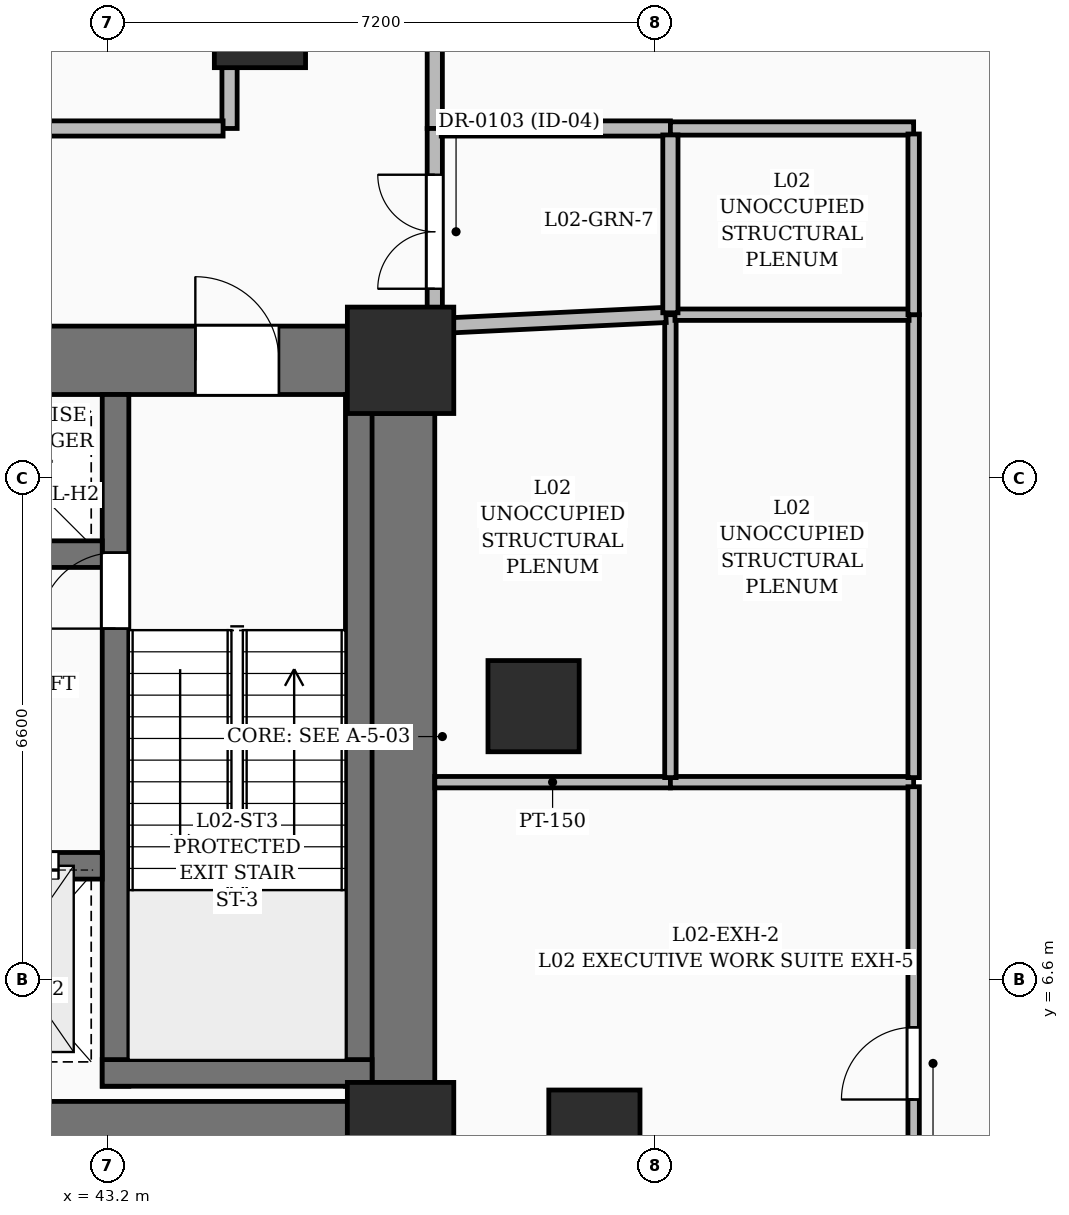
"""IFC4 building model, lengths in metres.
Left out: names, types, materials, properties, quantities, classifications, styles, units other than length and angle.
Written with IfcOpenShell. Run it as: python <this file> out.ifc"""

import sys

from ifc_helpers import new_model, si_unit, direction, frame, frame_2d, origin, origin_2d, place, context, subcontext, project, spatial, rectangle, extrude, element, fill, save


model = new_model("IFC4")
c1 = context("Model", 3, precision=1e-05, world=origin(), true_north=direction((0.0, 1.0)))
c2 = subcontext(c1, "Body", "Model", "MODEL_VIEW")
j1 = project(units=[si_unit("LENGTHUNIT", "METRE"), si_unit("PLANEANGLEUNIT", "RADIAN")], contexts=[c1])
p1 = place(None, origin())
s1 = spatial("IfcSite", under=j1, at=p1, CompositionType="ELEMENT")
p2 = place(p1, origin())
s2 = spatial("IfcBuilding", under=s1, at=p2, CompositionType="ELEMENT")
p3 = place(p2, frame((0.0, 0.0, 12.9)))
s3 = spatial("IfcBuildingStorey", under=s2, at=p3, CompositionType="ELEMENT", Elevation=12.9)
for number, where, z_axis, x_axis in (
    (1, (47.05, 4.55, 0.0), (0.0, 0.0, 1.0), (1.0, 0.0, 0.0)),
    (2, (47.05, 14.75, 0.0), (0.0, 0.0, 1.0), (1.0, 0.0, 0.0)),
):
    element("IfcColumn", number, at=place(p3, frame(where, z_axis=z_axis, x_axis=x_axis)), inside=s3, PredefinedType="COLUMN", context=c2, shape_type="SweptSolid", body=[
        extrude(rectangle(XDim=1.4, YDim=1.4, at=origin_2d()), origin(), (0.0, 0.0, 1.0), 4.5),
    ])
for number, where, z_axis, x_axis in (
    (3, (49.6, 4.55, 0.0), (0.0, 0.0, 1.0), (1.0, 0.0, 0.0)),
    (4, (48.8, 10.2, 0.0), (0.0, 0.0, 1.0), (1.0, 0.0, 0.0)),
    (5, (45.2, 19.2, 0.0), (0.0, 0.0, 1.0), (1.0, 0.0, 0.0)),
):
    element("IfcColumn", number, at=place(p3, frame(where, z_axis=z_axis, x_axis=x_axis)), inside=s3, PredefinedType="COLUMN", context=c2, shape_type="SweptSolid", body=[
        extrude(rectangle(XDim=1.2, YDim=1.2, at=origin_2d()), origin(), (0.0, 0.0, 1.0), 4.5),
    ])
p4 = place(p3, frame((35.85, 4.55, 0.0), z_axis=(0.0, 0.0, 1.0), x_axis=(1.0, 0.0, 0.0)))
e6 = element("IfcWall", 6, at=p4, inside=s3, PredefinedType="SHEAR", context=c2, shape_type="SweptSolid", body=[
    extrude(rectangle(XDim=10.5, YDim=0.9, at=frame_2d((5.25, 0.0))), origin(), (0.0, 0.0, 1.0), 4.5),
])
p5 = place(p3, frame((35.85, 14.75, 0.0), z_axis=(0.0, 0.0, 1.0), x_axis=(1.0, 0.0, 0.0)))
e7 = element("IfcWall", 7, at=p5, inside=s3, PredefinedType="SHEAR", context=c2, shape_type="SweptSolid", body=[
    extrude(rectangle(XDim=10.5, YDim=0.9, at=frame_2d((5.25, 0.0))), origin(), (0.0, 0.0, 1.0), 4.5),
])
p6 = place(p5, frame((0.9, 0.0, 0.0)))
e8 = element("IfcOpeningElement", 8, at=p6, cuts=e7, PredefinedType="OPENING", context=c2, shape_type="SweptSolid", body=[
    extrude(rectangle(XDim=1.1, YDim=2.2, at=frame_2d((0.55, 1.1))), frame((0.0, 0.46, 0.0), z_axis=(0.0, -1.0, 0.0), x_axis=(1.0, 0.0, 0.0)), (0.0, 0.0, 1.0), 0.92),
])
p7 = place(p5, frame((8.5, 0.0, 0.0)))
e9 = element("IfcOpeningElement", 9, at=p7, cuts=e7, PredefinedType="OPENING", context=c2, shape_type="SweptSolid", body=[
    extrude(rectangle(XDim=1.1, YDim=2.2, at=frame_2d((0.55, 1.1))), frame((0.0, 0.46, 0.0), z_axis=(0.0, -1.0, 0.0), x_axis=(1.0, 0.0, 0.0)), (0.0, 0.0, 1.0), 0.92),
])
p8 = place(p3, frame((47.05, 5.25, 0.0), z_axis=(0.0, 0.0, 1.0), x_axis=(0.0, 1.0, 0.0)))
e10 = element("IfcWall", 10, at=p8, inside=s3, PredefinedType="SHEAR", context=c2, shape_type="SweptSolid", body=[
    extrude(rectangle(XDim=8.8, YDim=0.9, at=frame_2d((4.4, 0.0))), origin(), (0.0, 0.0, 1.0), 4.5),
])
p9 = place(p3, frame((43.3, 5.2, 0.0), z_axis=(0.0, 0.0, 1.0), x_axis=(0.0, 1.0, 0.0)))
e11 = element("IfcWall", 11, at=p9, inside=s3, PredefinedType="SOLIDWALL", context=c2, shape_type="SweptSolid", body=[
    extrude(rectangle(XDim=9.1, YDim=0.35, at=frame_2d((4.55, 0.0))), origin(), (0.0, 0.0, 1.0), 4.5),
])
p10 = place(p9, frame((6.02, 0.0, 0.0)))
e12 = element("IfcOpeningElement", 12, at=p10, cuts=e11, PredefinedType="OPENING", context=c2, shape_type="SweptSolid", body=[
    extrude(rectangle(XDim=1.0, YDim=2.15, at=frame_2d((0.5, 1.075))), frame((0.0, 0.185, 0.0), z_axis=(0.0, -1.0, 0.0), x_axis=(1.0, 0.0, 0.0)), (0.0, 0.0, 1.0), 0.37),
])
p11 = place(p3, frame((46.5, 5.2, 0.0), z_axis=(0.0, 0.0, 1.0), x_axis=(0.0, 1.0, 0.0)))
e13 = element("IfcWall", 13, at=p11, inside=s3, PredefinedType="SOLIDWALL", context=c2, shape_type="SweptSolid", body=[
    extrude(rectangle(XDim=9.1, YDim=0.35, at=frame_2d((4.55, 0.0))), origin(), (0.0, 0.0, 1.0), 4.5),
])
p12 = place(p3, frame((43.125, 5.375, 0.0), z_axis=(0.0, 0.0, 1.0), x_axis=(1.0, 0.0, 0.0)))
e14 = element("IfcWall", 14, at=p12, inside=s3, PredefinedType="SOLIDWALL", context=c2, shape_type="SweptSolid", body=[
    extrude(rectangle(XDim=3.55, YDim=0.35, at=frame_2d((1.775, 0.0))), origin(), (0.0, 0.0, 1.0), 4.5),
])
p13 = place(p3, frame((39.075, 8.1, 0.0), z_axis=(0.0, 0.0, 1.0), x_axis=(1.0, 0.0, 0.0)))
e15 = element("IfcWall", 15, at=p13, inside=s3, PredefinedType="SOLIDWALL", context=c2, shape_type="SweptSolid", body=[
    extrude(rectangle(XDim=4.05, YDim=0.35, at=frame_2d((2.025, 0.0))), origin(), (0.0, 0.0, 1.0), 4.5),
])
p14 = place(p13, frame((2.175, 0.0, 0.0)))
e16 = element("IfcOpeningElement", 16, at=p14, cuts=e15, PredefinedType="OPENING", context=c2, shape_type="SweptSolid", body=[
    extrude(rectangle(XDim=1.3, YDim=2.25, at=frame_2d((0.65, 1.125))), frame((0.0, 0.185, 0.0), z_axis=(0.0, -1.0, 0.0), x_axis=(1.0, 0.0, 0.0)), (0.0, 0.0, 1.0), 0.37),
])
p15 = place(p13, frame((0.275, 0.0, 0.0)))
e17 = element("IfcOpeningElement", 17, at=p15, cuts=e15, PredefinedType="OPENING", context=c2, shape_type="SweptSolid", body=[
    extrude(rectangle(XDim=1.1, YDim=2.2, at=frame_2d((0.55, 1.1))), frame((0.0, 0.185, 0.0), z_axis=(0.0, -1.0, 0.0), x_axis=(1.0, 0.0, 0.0)), (0.0, 0.0, 1.0), 0.37),
])
p16 = place(p3, frame((39.075, 12.2, 0.0), z_axis=(0.0, 0.0, 1.0), x_axis=(1.0, 0.0, 0.0)))
e18 = element("IfcWall", 18, at=p16, inside=s3, PredefinedType="SOLIDWALL", context=c2, shape_type="SweptSolid", body=[
    extrude(rectangle(XDim=4.05, YDim=0.35, at=frame_2d((2.025, 0.0))), origin(), (0.0, 0.0, 1.0), 4.5),
])
p17 = place(p3, frame((47.5, 17.8, 0.0), z_axis=(0.0, 0.0, 1.0), x_axis=(0.0, 1.0, 0.0)))
e19 = element("IfcWall", 19, at=p17, inside=s3, PredefinedType="PARTITIONING", context=c2, shape_type="SweptSolid", body=[
    extrude(rectangle(XDim=6.7, YDim=0.2, at=frame_2d((3.35, 0.0))), origin(), (0.0, 0.0, 1.0), 3.637),
])
p18 = place(p17, frame((2.491, 0.0, 0.0)))
e20 = element("IfcOpeningElement", 20, at=p18, cuts=e19, PredefinedType="OPENING", context=c2, shape_type="SweptSolid", body=[
    extrude(rectangle(XDim=1.6, YDim=2.3, at=frame_2d((0.8, 1.15))), frame((0.0, 0.11, 0.0), z_axis=(0.0, -1.0, 0.0), x_axis=(1.0, 0.0, 0.0)), (0.0, 0.0, 1.0), 0.22),
])
p19 = place(p3, frame((47.5, 15.2, 0.0), z_axis=(0.0, 0.0, 1.0), x_axis=(0.0, 1.0, 0.0)))
e21 = element("IfcWall", 21, at=p19, inside=s3, PredefinedType="PARTITIONING", context=c2, shape_type="SweptSolid", body=[
    extrude(rectangle(XDim=2.6, YDim=0.2, at=frame_2d((1.3, 0.0))), origin(), (0.0, 0.0, 1.0), 3.078),
])
p20 = place(p19, frame((0.491, 0.0, 0.0)))
e22 = element("IfcOpeningElement", 22, at=p20, cuts=e21, PredefinedType="OPENING", context=c2, shape_type="SweptSolid", body=[
    extrude(rectangle(XDim=1.5, YDim=2.2, at=frame_2d((0.75, 1.1))), frame((0.0, 0.11, 0.0), z_axis=(0.0, -1.0, 0.0), x_axis=(1.0, 0.0, 0.0)), (0.0, 0.0, 1.0), 0.22),
])
p21 = place(p3, frame((44.8, 25.5, 0.0), z_axis=(0.0, 0.0, 1.0), x_axis=(0.0, -1.0, 0.0)))
e23 = element("IfcWall", 23, at=p21, inside=s3, PredefinedType="PARTITIONING", context=c2, shape_type="SweptSolid", body=[
    extrude(rectangle(XDim=7.7, YDim=0.2, at=frame_2d((3.85, 0.0))), origin(), (0.0, 0.0, 1.0), 3.159),
])
p22 = place(p3, frame((44.715, 17.8, 0.0), z_axis=(0.0, 0.0, 1.0), x_axis=(-1.0, 0.0, 0.0)))
e24 = element("IfcWall", 24, at=p22, inside=s3, PredefinedType="PARTITIONING", context=c2, shape_type="SweptSolid", body=[
    extrude(rectangle(XDim=15.515, YDim=0.2, at=frame_2d((7.758, 0.0))), origin(), (0.0, 0.0, 1.0), 3.159),
])
p23 = place(p22, frame((7.205, 0.0, 0.0)))
e25 = element("IfcOpeningElement", 25, at=p23, cuts=e24, PredefinedType="OPENING", context=c2, shape_type="SweptSolid", body=[
    extrude(rectangle(XDim=0.9, YDim=2.1, at=frame_2d((0.45, 1.05))), frame((0.0, 0.11, 0.0), z_axis=(0.0, -1.0, 0.0), x_axis=(1.0, 0.0, 0.0)), (0.0, 0.0, 1.0), 0.22),
])
p24 = place(p3, frame((50.6, 9.2, 0.0), z_axis=(0.0, 0.0, 1.0), x_axis=(-1.0, 0.0, 0.0)))
e26 = element("IfcWall", 26, at=p24, inside=s3, PredefinedType="PARTITIONING", context=c2, shape_type="SweptSolid", body=[
    extrude(rectangle(XDim=3.1, YDim=0.15, at=frame_2d((1.55, 0.0))), origin(), (0.0, 0.0, 1.0), 3.159),
])
p25 = place(p3, frame((53.8, 9.2, 0.0), z_axis=(0.0, 0.0, 1.0), x_axis=(-1.0, 0.0, 0.0)))
e27 = element("IfcWall", 27, at=p25, inside=s3, PredefinedType="PARTITIONING", context=c2, shape_type="SweptSolid", body=[
    extrude(rectangle(XDim=3.2, YDim=0.15, at=frame_2d((1.6, 0.0))), origin(), (0.0, 0.0, 1.0), 3.637),
])
p26 = place(p3, frame((53.8, 1.9, 0.0), z_axis=(0.0, 0.0, 1.0), x_axis=(0.0, 1.0, 0.0)))
e28 = element("IfcWall", 28, at=p26, inside=s3, PredefinedType="PARTITIONING", context=c2, shape_type="SweptSolid", body=[
    extrude(rectangle(XDim=7.24, YDim=0.15, at=frame_2d((3.62, 0.0))), origin(), (0.0, 0.0, 1.0), 2.97),
])
p27 = place(p26, frame((3.125, 0.0, 0.0)))
e29 = element("IfcOpeningElement", 29, at=p27, cuts=e28, PredefinedType="OPENING", context=c2, shape_type="SweptSolid", body=[
    extrude(rectangle(XDim=0.95, YDim=2.2, at=frame_2d((0.475, 1.1))), frame((0.0, 0.085, 0.0), z_axis=(0.0, -1.0, 0.0), x_axis=(1.0, 0.0, 0.0)), (0.0, 0.0, 1.0), 0.17),
])
p28 = place(p3, frame((50.6, 9.26, 0.0), z_axis=(0.0, 0.0, 1.0), x_axis=(0.0, 1.0, 0.0)))
e30 = element("IfcWall", 30, at=p28, inside=s3, PredefinedType="PARTITIONING", context=c2, shape_type="SweptSolid", body=[
    extrude(rectangle(XDim=6.09, YDim=0.15, at=frame_2d((3.045, 0.0))), origin(), (0.0, 0.0, 1.0), 3.078),
])
p29 = place(p3, frame((50.54, 15.347, 0.0), z_axis=(0.0, 0.0, 1.0), x_axis=(-0.998830110694, -0.048357108796, 0.0)))
e31 = element("IfcWall", 31, at=p29, inside=s3, PredefinedType="PARTITIONING", context=c2, shape_type="SweptSolid", body=[
    extrude(rectangle(XDim=2.958, YDim=0.2, at=frame_2d((1.479, 0.0))), origin(), (0.0, 0.0, 1.0), 3.078),
])
p30 = place(p3, frame((53.8, 9.26, 0.0), z_axis=(0.0, 0.0, 1.0), x_axis=(0.0, 1.0, 0.0)))
e32 = element("IfcWall", 32, at=p30, inside=s3, PredefinedType="PARTITIONING", context=c2, shape_type="SweptSolid", body=[
    extrude(rectangle(XDim=6.09, YDim=0.15, at=frame_2d((3.045, 0.0))), origin(), (0.0, 0.0, 1.0), 3.078),
])
p31 = place(p3, frame((53.74, 15.35, 0.0), z_axis=(0.0, 0.0, 1.0), x_axis=(-1.0, 0.0, 0.0)))
e33 = element("IfcWall", 33, at=p31, inside=s3, PredefinedType="PARTITIONING", context=c2, shape_type="SweptSolid", body=[
    extrude(rectangle(XDim=3.08, YDim=0.15, at=frame_2d((1.54, 0.0))), origin(), (0.0, 0.0, 1.0), 3.637),
])
p32 = place(p3, frame((47.585, 17.8, 0.0), z_axis=(0.0, 0.0, 1.0), x_axis=(1.0, 0.0, 0.0)))
e34 = element("IfcWall", 34, at=p32, inside=s3, PredefinedType="PARTITIONING", context=c2, shape_type="SweptSolid", body=[
    extrude(rectangle(XDim=3.015, YDim=0.2, at=frame_2d((1.508, 0.0))), origin(), (0.0, 0.0, 1.0), 3.078),
])
p33 = place(p3, frame((50.6, 17.8, 0.0), z_axis=(0.0, 0.0, 1.0), x_axis=(1.0, 0.0, 0.0)))
e35 = element("IfcWall", 35, at=p33, inside=s3, PredefinedType="PARTITIONING", context=c2, shape_type="SweptSolid", body=[
    extrude(rectangle(XDim=3.2, YDim=0.175, at=frame_2d((1.6, 0.0))), origin(), (0.0, 0.0, 1.0), 3.637),
])
p34 = place(p3, frame((53.8, 17.728, 0.0), z_axis=(0.0, 0.0, 1.0), x_axis=(0.0, -1.0, 0.0)))
e36 = element("IfcWall", 36, at=p34, inside=s3, PredefinedType="PARTITIONING", context=c2, shape_type="SweptSolid", body=[
    extrude(rectangle(XDim=2.377, YDim=0.15, at=frame_2d((1.189, 0.0))), origin(), (0.0, 0.0, 1.0), 3.637),
])
p35 = place(p3, frame((50.6, 15.375, 0.0), z_axis=(0.0, 0.0, 1.0), x_axis=(0.0, 1.0, 0.0)))
e37 = element("IfcWall", 37, at=p35, inside=s3, PredefinedType="PARTITIONING", context=c2, shape_type="SweptSolid", body=[
    extrude(rectangle(XDim=2.34, YDim=0.2, at=frame_2d((1.17, 0.0))), origin(), (0.0, 0.0, 1.0), 4.2),
])
p36 = place(p7, origin())
e38 = element("IfcDoor", 38, at=p36, inside=s3, OperationType="SINGLE_SWING_LEFT", PredefinedType="DOOR", context=c2, shape_type="SweptSolid", body=[
    extrude(rectangle(XDim=1.1, YDim=2.2, at=frame_2d((0.55, 1.1))), frame((0.0, 0.025, 0.0), z_axis=(0.0, -1.0, 0.0), x_axis=(1.0, 0.0, 0.0)), (0.0, 0.0, 1.0), 0.05),
])
fill(e9, e38)
p37 = place(p10, origin())
e39 = element("IfcDoor", 39, at=p37, inside=s3, OperationType="SINGLE_SWING_LEFT", PredefinedType="DOOR", context=c2, shape_type="SweptSolid", body=[
    extrude(rectangle(XDim=1.0, YDim=2.15, at=frame_2d((0.5, 1.075))), frame((0.0, 0.025, 0.0), z_axis=(0.0, -1.0, 0.0), x_axis=(1.0, 0.0, 0.0)), (0.0, 0.0, 1.0), 0.05),
])
fill(e12, e39)
p38 = place(p14, origin())
e40 = element("IfcDoor", 40, at=p38, inside=s3, OperationType="DOUBLE_DOOR_SLIDING", PredefinedType="DOOR", context=c2, shape_type="SweptSolid", body=[
    extrude(rectangle(XDim=1.3, YDim=2.25, at=frame_2d((0.65, 1.125))), frame((0.0, 0.025, 0.0), z_axis=(0.0, -1.0, 0.0), x_axis=(1.0, 0.0, 0.0)), (0.0, 0.0, 1.0), 0.05),
])
fill(e16, e40)
p39 = place(p20, origin())
e41 = element("IfcDoor", 41, at=p39, inside=s3, OperationType="DOUBLE_DOOR_SINGLE_SWING", PredefinedType="DOOR", context=c2, shape_type="SweptSolid", body=[
    extrude(rectangle(XDim=1.5, YDim=2.2, at=frame_2d((0.75, 1.1))), frame((0.0, 0.025, 0.0), z_axis=(0.0, -1.0, 0.0), x_axis=(1.0, 0.0, 0.0)), (0.0, 0.0, 1.0), 0.05),
])
fill(e22, e41)
p40 = place(p27, origin())
e42 = element("IfcDoor", 42, at=p40, inside=s3, OperationType="SINGLE_SWING_LEFT", PredefinedType="DOOR", context=c2, shape_type="SweptSolid", body=[
    extrude(rectangle(XDim=0.95, YDim=2.2, at=frame_2d((0.475, 1.1))), frame((0.0, 0.025, 0.0), z_axis=(0.0, -1.0, 0.0), x_axis=(1.0, 0.0, 0.0)), (0.0, 0.0, 1.0), 0.05),
])
fill(e29, e42)
save(model, sys.argv[1])
